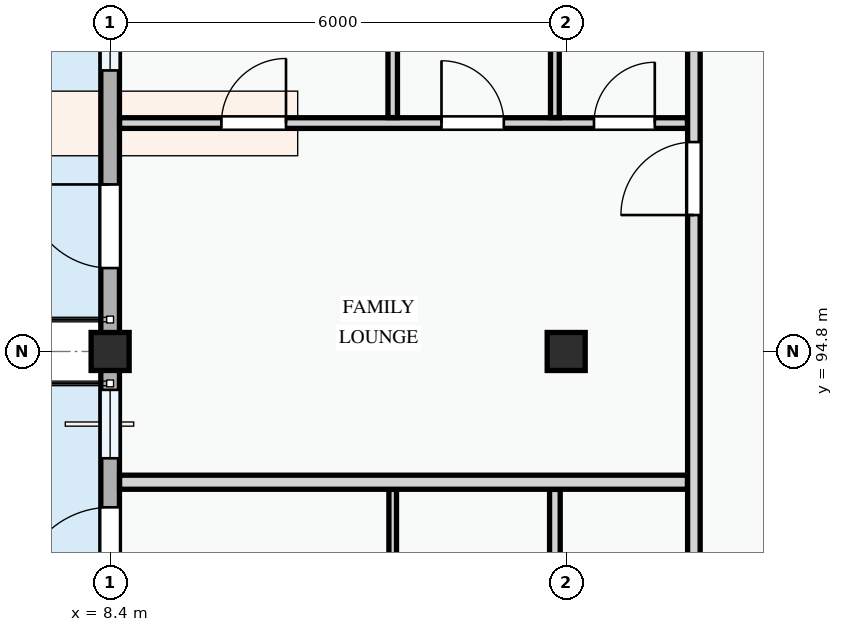
"""IFC4 building model, lengths in metres.
Left out: names, types, materials, properties, quantities, classifications, styles, units other than length and angle.
Written with IfcOpenShell. Run it as: python <this file> out.ifc"""

import sys

from ifc_helpers import new_model, si_unit, direction, frame, frame_2d, origin, origin_2d, place, context, subcontext, project, spatial, rectangle, extrude, element, fill, save


model = new_model("IFC4")
c1 = context("Model", 3, precision=1e-05, world=origin(), true_north=direction((0.0, 1.0)))
c2 = subcontext(c1, "Body", "Model", "MODEL_VIEW")
j1 = project(units=[si_unit("LENGTHUNIT", "METRE"), si_unit("PLANEANGLEUNIT", "RADIAN")], contexts=[c1])
p1 = place(None, origin())
s1 = spatial("IfcSite", under=j1, at=p1, CompositionType="ELEMENT")
p2 = place(p1, origin())
s2 = spatial("IfcBuilding", under=s1, at=p2, CompositionType="ELEMENT")
p3 = place(p2, frame((0.0, 0.0, 41.1)))
s3 = spatial("IfcBuildingStorey", under=s2, at=p3, CompositionType="ELEMENT", Elevation=41.1)
for number, where, z_axis, x_axis in (
    (1, (8.4, 94.8, 0.0), (0.0, 0.0, 1.0), (1.0, 0.0, 0.0)),
    (2, (14.4, 94.8, 0.0), (0.0, 0.0, 1.0), (1.0, 0.0, 0.0)),
):
    element("IfcColumn", number, at=place(p3, frame(where, z_axis=z_axis, x_axis=x_axis)), inside=s3, PredefinedType="COLUMN", context=c2, shape_type="SweptSolid", body=[
        extrude(rectangle(XDim=0.5, YDim=0.5, at=origin_2d()), origin(), (0.0, 0.0, 1.0), 3.3),
    ])
p4 = place(p3, frame((8.4, 100.8, 0.0), z_axis=(0.0, 0.0, 1.0), x_axis=(0.0, -1.0, 0.0)))
e3 = element("IfcWall", 3, at=p4, inside=s3, PredefinedType="STANDARD", context=c2, shape_type="SweptSolid", body=[
    extrude(rectangle(XDim=6.0, YDim=0.245, at=frame_2d((3.0, 0.0))), origin(), (0.0, 0.0, 1.0), 2.445),
])
p5 = place(p4, frame((3.802, 0.0, 0.0)))
e4 = element("IfcOpeningElement", 4, at=p5, cuts=e3, PredefinedType="OPENING", context=c2, shape_type="SweptSolid", body=[
    extrude(rectangle(XDim=1.1, YDim=2.15, at=frame_2d((0.55, 1.075))), frame((0.0, 0.133, 0.0), z_axis=(0.0, -1.0, 0.0), x_axis=(1.0, 0.0, 0.0)), (0.0, 0.0, 1.0), 0.265),
])
p6 = place(p4, frame((0.883, 0.0, 0.78)))
e5 = element("IfcOpeningElement", 5, at=p6, cuts=e3, PredefinedType="OPENING", context=c2, shape_type="SweptSolid", body=[
    extrude(rectangle(XDim=1.42, YDim=1.38, at=frame_2d((0.71, 0.69))), frame((0.0, 0.133, 0.0), z_axis=(0.0, -1.0, 0.0), x_axis=(1.0, 0.0, 0.0)), (0.0, 0.0, 1.0), 0.265),
])
p7 = place(p3, frame((8.4, 94.8, 0.0), z_axis=(0.0, 0.0, 1.0), x_axis=(0.0, -1.0, 0.0)))
e6 = element("IfcWall", 6, at=p7, inside=s3, PredefinedType="STANDARD", context=c2, shape_type="SweptSolid", body=[
    extrude(rectangle(XDim=8.4, YDim=0.245, at=frame_2d((4.2, 0.0))), origin(), (0.0, 0.0, 1.0), 2.345),
])
p8 = place(p7, frame((2.05, 0.0, 0.0)))
e7 = element("IfcOpeningElement", 7, at=p8, cuts=e6, PredefinedType="OPENING", context=c2, shape_type="SweptSolid", body=[
    extrude(rectangle(XDim=1.2, YDim=2.15, at=frame_2d((0.6, 1.075))), frame((0.0, 0.133, 0.0), z_axis=(0.0, -1.0, 0.0), x_axis=(1.0, 0.0, 0.0)), (0.0, 0.0, 1.0), 0.265),
])
p9 = place(p7, frame((0.505, 0.0, 0.78)))
e8 = element("IfcOpeningElement", 8, at=p9, cuts=e6, PredefinedType="OPENING", context=c2, shape_type="SweptSolid", body=[
    extrude(rectangle(XDim=0.9, YDim=1.2, at=frame_2d((0.45, 0.6))), frame((0.0, 0.133, 0.0), z_axis=(0.0, -1.0, 0.0), x_axis=(1.0, 0.0, 0.0)), (0.0, 0.0, 1.0), 0.265),
])
p10 = place(p7, frame((3.64, 0.0, 0.78)))
e9 = element("IfcOpeningElement", 9, at=p10, cuts=e6, PredefinedType="OPENING", context=c2, shape_type="SweptSolid", body=[
    extrude(rectangle(XDim=1.05, YDim=1.2, at=frame_2d((0.525, 0.6))), frame((0.0, 0.133, 0.0), z_axis=(0.0, -1.0, 0.0), x_axis=(1.0, 0.0, 0.0)), (0.0, 0.0, 1.0), 0.265),
])
p11 = place(p7, frame((5.92, 0.0, 0.78)))
e10 = element("IfcOpeningElement", 10, at=p11, cuts=e6, PredefinedType="OPENING", context=c2, shape_type="SweptSolid", body=[
    extrude(rectangle(XDim=1.4, YDim=1.45, at=frame_2d((0.7, 0.725))), frame((0.0, 0.133, 0.0), z_axis=(0.0, -1.0, 0.0), x_axis=(1.0, 0.0, 0.0)), (0.0, 0.0, 1.0), 0.265),
])
p12 = place(p3, frame((12.118, 89.83, 0.0), z_axis=(0.0, 0.0, 1.0), x_axis=(0.0, 1.0, 0.0)))
e11 = element("IfcWall", 11, at=p12, inside=s3, PredefinedType="PARTITIONING", context=c2, shape_type="SweptSolid", body=[
    extrude(rectangle(XDim=3.156, YDim=0.1, at=frame_2d((1.578, 0.0))), origin(), (0.0, 0.0, 1.0), 3.0),
])
p13 = place(p3, frame((14.251, 89.83, 0.0), z_axis=(0.0, 0.0, 1.0), x_axis=(0.0, 1.0, 0.0)))
e12 = element("IfcWall", 12, at=p13, inside=s3, PredefinedType="PARTITIONING", context=c2, shape_type="SweptSolid", body=[
    extrude(rectangle(XDim=3.156, YDim=0.14, at=frame_2d((1.578, 0.0))), origin(), (0.0, 0.0, 1.0), 2.425),
])
p14 = place(p3, frame((8.524, 97.805, 0.0), z_axis=(0.0, 0.0, 1.0), x_axis=(1.0, 0.0, 0.0)))
e13 = element("IfcWall", 13, at=p14, inside=s3, PredefinedType="PARTITIONING", context=c2, shape_type="SweptSolid", body=[
    extrude(rectangle(XDim=7.471, YDim=0.14, at=frame_2d((3.736, 0.0))), origin(), (0.0, 0.0, 1.0), 3.0),
])
p15 = place(p14, frame((1.339, 0.0, 0.0)))
e14 = element("IfcOpeningElement", 14, at=p15, cuts=e13, PredefinedType="OPENING", context=c2, shape_type="SweptSolid", body=[
    extrude(rectangle(XDim=0.85, YDim=2.1, at=frame_2d((0.425, 1.05))), frame((0.0, 0.08, 0.0), z_axis=(0.0, -1.0, 0.0), x_axis=(1.0, 0.0, 0.0)), (0.0, 0.0, 1.0), 0.16),
])
p16 = place(p14, frame((4.235, 0.0, 0.0)))
e15 = element("IfcOpeningElement", 15, at=p16, cuts=e13, PredefinedType="OPENING", context=c2, shape_type="SweptSolid", body=[
    extrude(rectangle(XDim=0.82, YDim=2.08, at=frame_2d((0.41, 1.04))), frame((0.0, 0.08, 0.0), z_axis=(0.0, -1.0, 0.0), x_axis=(1.0, 0.0, 0.0)), (0.0, 0.0, 1.0), 0.16),
])
p17 = place(p14, frame((6.241, 0.0, 0.0)))
e16 = element("IfcOpeningElement", 16, at=p17, cuts=e13, PredefinedType="OPENING", context=c2, shape_type="SweptSolid", body=[
    extrude(rectangle(XDim=0.8, YDim=2.1, at=frame_2d((0.4, 1.05))), frame((0.0, 0.08, 0.0), z_axis=(0.0, -1.0, 0.0), x_axis=(1.0, 0.0, 0.0)), (0.0, 0.0, 1.0), 0.16),
])
p18 = place(p3, frame((12.118, 97.877, 0.0), z_axis=(0.0, 0.0, 1.0), x_axis=(0.0, 1.0, 0.0)))
e17 = element("IfcWall", 17, at=p18, inside=s3, PredefinedType="PARTITIONING", context=c2, shape_type="SweptSolid", body=[
    extrude(rectangle(XDim=4.541, YDim=0.125, at=frame_2d((2.271, 0.0))), origin(), (0.0, 0.0, 1.0), 3.0),
])
p19 = place(p3, frame((14.251, 97.877, 0.0), z_axis=(0.0, 0.0, 1.0), x_axis=(0.0, 1.0, 0.0)))
e18 = element("IfcWall", 18, at=p19, inside=s3, PredefinedType="PARTITIONING", context=c2, shape_type="SweptSolid", body=[
    extrude(rectangle(XDim=4.541, YDim=0.115, at=frame_2d((2.271, 0.0))), origin(), (0.0, 0.0, 1.0), 2.425),
])
p20 = place(p3, frame((8.524, 93.08, 0.0), z_axis=(0.0, 0.0, 1.0), x_axis=(1.0, 0.0, 0.0)))
e19 = element("IfcWall", 19, at=p20, inside=s3, PredefinedType="PARTITIONING", context=c2, shape_type="SweptSolid", body=[
    extrude(rectangle(XDim=7.471, YDim=0.185, at=frame_2d((3.736, 0.0))), origin(), (0.0, 0.0, 1.0), 3.0),
])
p21 = place(p3, frame((16.08, 86.524, 0.0), z_axis=(0.0, 0.0, 1.0), x_axis=(0.0, 1.0, 0.0)))
e20 = element("IfcWall", 20, at=p21, inside=s3, PredefinedType="PARTITIONING", context=c2, shape_type="SweptSolid", body=[
    extrude(rectangle(XDim=22.816, YDim=0.165, at=frame_2d((11.408, 0.0))), origin(), (0.0, 0.0, 1.0), 3.0),
])
p22 = place(p21, frame((2.035, 0.0, 0.0)))
e21 = element("IfcOpeningElement", 21, at=p22, cuts=e20, PredefinedType="OPENING", context=c2, shape_type="SweptSolid", body=[
    extrude(rectangle(XDim=0.92, YDim=2.1, at=frame_2d((0.46, 1.05))), frame((0.0, 0.093, 0.0), z_axis=(0.0, -1.0, 0.0), x_axis=(1.0, 0.0, 0.0)), (0.0, 0.0, 1.0), 0.185),
])
p23 = place(p21, frame((10.071, 0.0, 0.0)))
e22 = element("IfcOpeningElement", 22, at=p23, cuts=e20, PredefinedType="OPENING", context=c2, shape_type="SweptSolid", body=[
    extrude(rectangle(XDim=0.96, YDim=2.12, at=frame_2d((0.48, 1.06))), frame((0.0, 0.093, 0.0), z_axis=(0.0, -1.0, 0.0), x_axis=(1.0, 0.0, 0.0)), (0.0, 0.0, 1.0), 0.185),
])
p24 = place(p21, frame((18.018, 0.0, 0.0)))
e23 = element("IfcOpeningElement", 23, at=p24, cuts=e20, PredefinedType="OPENING", context=c2, shape_type="SweptSolid", body=[
    extrude(rectangle(XDim=0.92, YDim=2.1, at=frame_2d((0.46, 1.05))), frame((0.0, 0.093, 0.0), z_axis=(0.0, -1.0, 0.0), x_axis=(1.0, 0.0, 0.0)), (0.0, 0.0, 1.0), 0.185),
])
p25 = place(p5, frame((1.1, 0.0, 0.0), z_axis=(0.0, 0.0, 1.0), x_axis=(-1.0, 0.0, 0.0)))
e24 = element("IfcDoor", 24, at=p25, inside=s3, OperationType="SINGLE_SWING_RIGHT", PredefinedType="DOOR", context=c2, shape_type="SweptSolid", body=[
    extrude(rectangle(XDim=1.1, YDim=2.15, at=frame_2d((0.55, 1.075))), frame((0.0, 0.025, 0.0), z_axis=(0.0, -1.0, 0.0), x_axis=(1.0, 0.0, 0.0)), (0.0, 0.0, 1.0), 0.05),
])
fill(e4, e24)
p26 = place(p6, origin())
e25 = element("IfcWindow", 25, at=p26, inside=s3, PartitioningType="SINGLE_PANEL", PredefinedType="WINDOW", context=c2, shape_type="SweptSolid", body=[
    extrude(rectangle(XDim=1.42, YDim=1.38, at=frame_2d((0.71, 0.69))), frame((0.0, 0.03, 0.0), z_axis=(0.0, -1.0, 0.0), x_axis=(1.0, 0.0, 0.0)), (0.0, 0.0, 1.0), 0.06),
])
fill(e5, e25)
p27 = place(p8, frame((1.2, 0.0, 0.0), z_axis=(0.0, 0.0, 1.0), x_axis=(-1.0, 0.0, 0.0)))
e26 = element("IfcDoor", 26, at=p27, inside=s3, OperationType="SINGLE_SWING_LEFT", PredefinedType="DOOR", context=c2, shape_type="SweptSolid", body=[
    extrude(rectangle(XDim=1.2, YDim=2.15, at=frame_2d((0.6, 1.075))), frame((0.0, 0.025, 0.0), z_axis=(0.0, -1.0, 0.0), x_axis=(1.0, 0.0, 0.0)), (0.0, 0.0, 1.0), 0.05),
])
fill(e7, e26)
p28 = place(p9, origin())
e27 = element("IfcWindow", 27, at=p28, inside=s3, PartitioningType="SINGLE_PANEL", PredefinedType="WINDOW", context=c2, shape_type="SweptSolid", body=[
    extrude(rectangle(XDim=0.9, YDim=1.2, at=frame_2d((0.45, 0.6))), frame((0.0, 0.03, 0.0), z_axis=(0.0, -1.0, 0.0), x_axis=(1.0, 0.0, 0.0)), (0.0, 0.0, 1.0), 0.06),
])
fill(e8, e27)
p29 = place(p15, origin())
e28 = element("IfcDoor", 28, at=p29, inside=s3, OperationType="SINGLE_SWING_RIGHT", PredefinedType="DOOR", context=c2, shape_type="SweptSolid", body=[
    extrude(rectangle(XDim=0.85, YDim=2.1, at=frame_2d((0.425, 1.05))), frame((0.0, 0.025, 0.0), z_axis=(0.0, -1.0, 0.0), x_axis=(1.0, 0.0, 0.0)), (0.0, 0.0, 1.0), 0.05),
])
fill(e14, e28)
p30 = place(p16, origin())
e29 = element("IfcDoor", 29, at=p30, inside=s3, OperationType="SINGLE_SWING_LEFT", PredefinedType="DOOR", context=c2, shape_type="SweptSolid", body=[
    extrude(rectangle(XDim=0.82, YDim=2.08, at=frame_2d((0.41, 1.04))), frame((0.0, 0.025, 0.0), z_axis=(0.0, -1.0, 0.0), x_axis=(1.0, 0.0, 0.0)), (0.0, 0.0, 1.0), 0.05),
])
fill(e15, e29)
p31 = place(p17, origin())
e30 = element("IfcDoor", 30, at=p31, inside=s3, OperationType="SINGLE_SWING_RIGHT", PredefinedType="DOOR", context=c2, shape_type="SweptSolid", body=[
    extrude(rectangle(XDim=0.8, YDim=2.1, at=frame_2d((0.4, 1.05))), frame((0.0, 0.025, 0.0), z_axis=(0.0, -1.0, 0.0), x_axis=(1.0, 0.0, 0.0)), (0.0, 0.0, 1.0), 0.05),
])
fill(e16, e30)
p32 = place(p23, origin())
e31 = element("IfcDoor", 31, at=p32, inside=s3, OperationType="SINGLE_SWING_LEFT", PredefinedType="DOOR", context=c2, shape_type="SweptSolid", body=[
    extrude(rectangle(XDim=0.96, YDim=2.12, at=frame_2d((0.48, 1.06))), frame((0.0, 0.025, 0.0), z_axis=(0.0, -1.0, 0.0), x_axis=(1.0, 0.0, 0.0)), (0.0, 0.0, 1.0), 0.05),
])
fill(e22, e31)
save(model, sys.argv[1])
